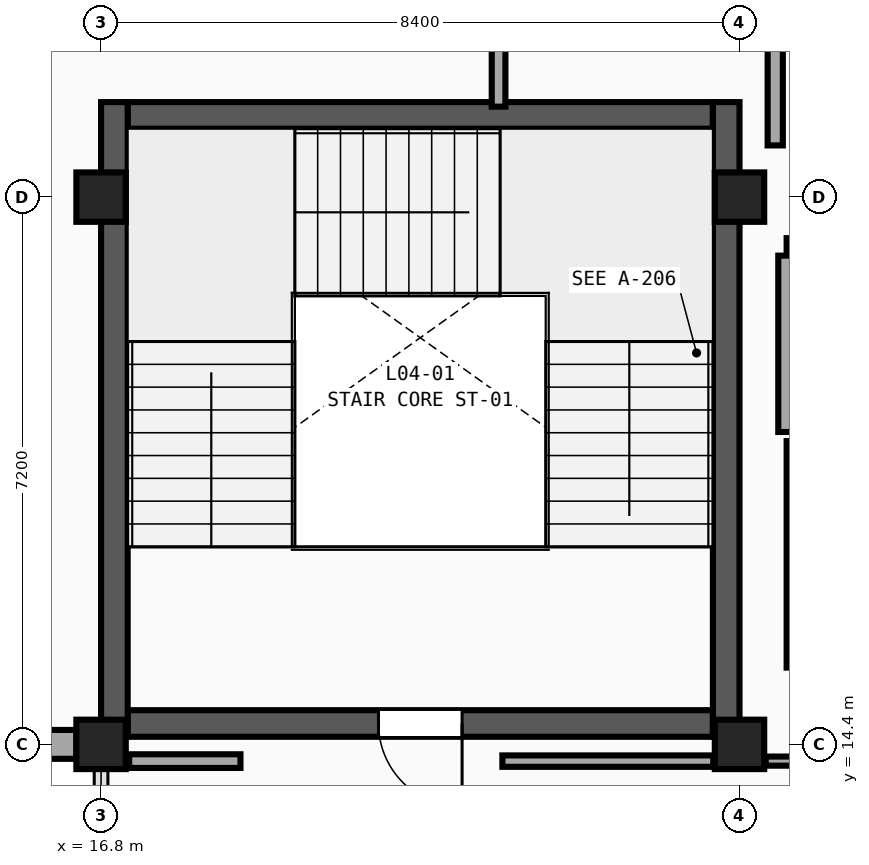
"""IFC4 building model, lengths in metres.
Left out: names, types, materials, properties, quantities, classifications, styles, units other than length and angle.
Written with IfcOpenShell. Run it as: python <this file> out.ifc"""

import sys

from ifc_helpers import new_model, si_unit, direction, frame, frame_2d, origin, origin_2d, place, context, subcontext, project, spatial, rectangle, extrude, element, fill, save


model = new_model("IFC4")
c1 = context("Model", 3, precision=1e-05, world=origin(), true_north=direction((0.0, 1.0)))
c2 = subcontext(c1, "Body", "Model", "MODEL_VIEW")
j1 = project(units=[si_unit("LENGTHUNIT", "METRE"), si_unit("PLANEANGLEUNIT", "RADIAN")], contexts=[c1])
p1 = place(None, origin())
s1 = spatial("IfcSite", under=j1, at=p1, CompositionType="ELEMENT")
p2 = place(p1, origin())
s2 = spatial("IfcBuilding", under=s1, at=p2, CompositionType="ELEMENT")
p3 = place(p2, frame((0.0, 0.0, 18.9)))
s3 = spatial("IfcBuildingStorey", under=s2, at=p3, CompositionType="ELEMENT", Elevation=18.9)
for number, where, z_axis, x_axis in (
    (1, (16.8, 14.4, 0.0), (0.0, 0.0, 1.0), (1.0, 0.0, 0.0)),
    (2, (16.8, 21.6, 0.0), (0.0, 0.0, 1.0), (1.0, 0.0, 0.0)),
    (3, (25.2, 14.4, 0.0), (0.0, 0.0, 1.0), (1.0, 0.0, 0.0)),
    (4, (25.2, 21.6, 0.0), (0.0, 0.0, 1.0), (1.0, 0.0, 0.0)),
):
    element("IfcColumn", number, at=place(p3, frame(where, z_axis=z_axis, x_axis=x_axis)), inside=s3, PredefinedType="COLUMN", context=c2, shape_type="SweptSolid", body=[
        extrude(rectangle(XDim=0.65, YDim=0.65, at=origin_2d()), origin(), (0.0, 0.0, 1.0), 4.5),
    ])
p4 = place(p3, frame((16.475, 14.4, 0.0), z_axis=(0.0, 0.0, 1.0), x_axis=(-1.0, 0.0, 0.0)))
e5 = element("IfcWall", 5, at=p4, inside=s3, PredefinedType="SOLIDWALL", context=c2, shape_type="SweptSolid", body=[
    extrude(rectangle(XDim=7.75, YDim=0.38, at=frame_2d((3.875, 0.0))), origin(), (0.0, 0.0, 1.0), 3.63),
])
p5 = place(p4, frame((1.27, 0.0, 0.75)))
e6 = element("IfcOpeningElement", 6, at=p5, cuts=e5, PredefinedType="OPENING", context=c2, shape_type="SweptSolid", body=[
    extrude(rectangle(XDim=1.8, YDim=2.73, at=frame_2d((0.9, 1.365))), frame((0.0, 0.21, 0.0), z_axis=(0.0, -1.0, 0.0), x_axis=(1.0, 0.0, 0.0)), (0.0, 0.0, 1.0), 0.42),
])
p6 = place(p4, frame((4.58, 0.0, 0.75)))
e7 = element("IfcOpeningElement", 7, at=p6, cuts=e5, PredefinedType="OPENING", context=c2, shape_type="SweptSolid", body=[
    extrude(rectangle(XDim=2.0, YDim=2.73, at=frame_2d((1.0, 1.365))), frame((0.0, 0.21, 0.0), z_axis=(0.0, -1.0, 0.0), x_axis=(1.0, 0.0, 0.0)), (0.0, 0.0, 1.0), 0.42),
])
p7 = place(p3, frame((24.85, 14.675, 0.0), z_axis=(0.0, 0.0, 1.0), x_axis=(-1.0, 0.0, 0.0)))
e8 = element("IfcWall", 8, at=p7, inside=s3, PredefinedType="SHEAR", context=c2, shape_type="SweptSolid", body=[
    extrude(rectangle(XDim=7.7, YDim=0.35, at=frame_2d((3.85, 0.0))), origin(), (0.0, 0.0, 1.0), 4.5),
])
p8 = place(p7, frame((3.3, 0.0, 0.0)))
e9 = element("IfcOpeningElement", 9, at=p8, cuts=e8, PredefinedType="OPENING", context=c2, shape_type="SweptSolid", body=[
    extrude(rectangle(XDim=1.1, YDim=2.2, at=frame_2d((0.55, 1.1))), frame((0.0, 0.195, 0.0), z_axis=(0.0, -1.0, 0.0), x_axis=(1.0, 0.0, 0.0)), (0.0, 0.0, 1.0), 0.39),
])
p9 = place(p3, frame((17.15, 22.675, 0.0), z_axis=(0.0, 0.0, 1.0), x_axis=(1.0, 0.0, 0.0)))
e10 = element("IfcWall", 10, at=p9, inside=s3, PredefinedType="SHEAR", context=c2, shape_type="SweptSolid", body=[
    extrude(rectangle(XDim=7.7, YDim=0.35, at=frame_2d((3.85, 0.0))), origin(), (0.0, 0.0, 1.0), 4.5),
])
for number, where, z_axis, x_axis in (
    (11, (16.975, 22.85, 0.0), (0.0, 0.0, 1.0), (0.0, -1.0, 0.0)),
    (12, (25.025, 14.5, 0.0), (0.0, 0.0, 1.0), (0.0, 1.0, 0.0)),
):
    element("IfcWall", number, at=place(p3, frame(where, z_axis=z_axis, x_axis=x_axis)), inside=s3, PredefinedType="SHEAR", context=c2, shape_type="SweptSolid", body=[
        extrude(rectangle(XDim=8.35, YDim=0.35, at=frame_2d((4.175, 0.0))), origin(), (0.0, 0.0, 1.0), 4.5),
    ])
p10 = place(p3, frame((25.94, 18.39, 0.0), z_axis=(0.0, 0.0, 1.0), x_axis=(0.0, -1.0, 0.0)))
e13 = element("IfcWall", 13, at=p10, inside=s3, PredefinedType="SHEAR", context=c2, shape_type="SweptSolid", body=[
    extrude(rectangle(XDim=2.98, YDim=0.24, at=frame_2d((1.49, 0.0))), origin(), (0.0, 0.0, 1.0), 4.18),
])
p11 = place(p3, frame((25.82, 20.95, 0.0), z_axis=(0.0, 0.0, 1.0), x_axis=(1.0, 0.0, 0.0)))
e14 = element("IfcWall", 14, at=p11, inside=s3, PredefinedType="SOLIDWALL", context=c2, shape_type="SweptSolid", body=[
    extrude(rectangle(XDim=2.54, YDim=0.22, at=frame_2d((1.27, 0.0))), origin(), (0.0, 0.0, 1.0), 3.73),
])
p12 = place(p11, frame((0.745, 0.0, 0.0)))
e15 = element("IfcOpeningElement", 15, at=p12, cuts=e14, PredefinedType="OPENING", context=c2, shape_type="SweptSolid", body=[
    extrude(rectangle(XDim=1.05, YDim=2.15, at=frame_2d((0.525, 1.075))), frame((0.0, 0.13, 0.0), z_axis=(0.0, -1.0, 0.0), x_axis=(1.0, 0.0, 0.0)), (0.0, 0.0, 1.0), 0.26),
])
p13 = place(p3, frame((25.82, 18.51, 0.0), z_axis=(0.0, 0.0, 1.0), x_axis=(0.0, 1.0, 0.0)))
e16 = element("IfcWall", 16, at=p13, inside=s3, PredefinedType="SOLIDWALL", context=c2, shape_type="SweptSolid", body=[
    extrude(rectangle(XDim=2.32, YDim=0.22, at=frame_2d((1.16, 0.0))), origin(), (0.0, 0.0, 1.0), 4.18),
])
p14 = place(p3, frame((22.08, 14.18, 0.0), z_axis=(0.0, 0.0, 1.0), x_axis=(1.0, 0.0, 0.0)))
e17 = element("IfcWall", 17, at=p14, inside=s3, PredefinedType="PARTITIONING", context=c2, shape_type="SweptSolid", body=[
    extrude(rectangle(XDim=2.775, YDim=0.15, at=frame_2d((1.387, 0.0))), origin(), (0.0, 0.0, 1.0), 3.73),
])
p15 = place(p3, frame((25.545, 14.18, 0.0), z_axis=(0.0, 0.0, 1.0), x_axis=(1.0, 0.0, 0.0)))
e18 = element("IfcWall", 18, at=p15, inside=s3, PredefinedType="PARTITIONING", context=c2, shape_type="SweptSolid", body=[
    extrude(rectangle(XDim=7.71, YDim=0.12, at=frame_2d((3.855, 0.0))), origin(), (0.0, 0.0, 1.0), 3.73),
])
p16 = place(p15, frame((3.255, 0.0, 0.0)))
e19 = element("IfcOpeningElement", 19, at=p16, cuts=e18, PredefinedType="OPENING", context=c2, shape_type="SweptSolid", body=[
    extrude(rectangle(XDim=1.2, YDim=2.05, at=frame_2d((0.6, 1.025))), frame((0.0, 0.08, 0.0), z_axis=(0.0, -1.0, 0.0), x_axis=(1.0, 0.0, 0.0)), (0.0, 0.0, 1.0), 0.16),
])
p17 = place(p3, frame((22.03, 22.79, 0.0), z_axis=(0.0, 0.0, 1.0), x_axis=(0.0, 1.0, 0.0)))
e20 = element("IfcWall", 20, at=p17, inside=s3, PredefinedType="PARTITIONING", context=c2, shape_type="SweptSolid", body=[
    extrude(rectangle(XDim=2.23, YDim=0.18, at=frame_2d((1.115, 0.0))), origin(), (0.0, 0.0, 1.0), 4.18),
])
p18 = place(p17, frame((1.188, 0.0, 0.0)))
e21 = element("IfcOpeningElement", 21, at=p18, cuts=e20, PredefinedType="OPENING", context=c2, shape_type="SweptSolid", body=[
    extrude(rectangle(XDim=0.88, YDim=2.45, at=frame_2d((0.44, 1.225))), frame((0.0, 0.11, 0.0), z_axis=(0.0, -1.0, 0.0), x_axis=(1.0, 0.0, 0.0)), (0.0, 0.0, 1.0), 0.22),
])
p19 = place(p3, frame((17.17, 14.18, 0.0), z_axis=(0.0, 0.0, 1.0), x_axis=(1.0, 0.0, 0.0)))
e22 = element("IfcWall", 22, at=p19, inside=s3, PredefinedType="PARTITIONING", context=c2, shape_type="SweptSolid", body=[
    extrude(rectangle(XDim=1.464, YDim=0.18, at=frame_2d((0.732, 0.0))), origin(), (0.0, 0.0, 1.0), 3.73),
])
p20 = place(p3, frame((25.67, 22.28, 0.0), z_axis=(0.0, 0.0, 1.0), x_axis=(0.0, 1.0, 0.0)))
e23 = element("IfcWall", 23, at=p20, inside=s3, PredefinedType="PLUMBINGWALL", context=c2, shape_type="SweptSolid", body=[
    extrude(rectangle(XDim=2.59, YDim=0.2, at=frame_2d((1.295, 0.0))), origin(), (0.0, 0.0, 1.0), 4.18),
])
p21 = place(p8, origin())
e24 = element("IfcDoor", 24, at=p21, inside=s3, OperationType="SINGLE_SWING_LEFT", PredefinedType="DOOR", context=c2, shape_type="SweptSolid", body=[
    extrude(rectangle(XDim=1.1, YDim=2.2, at=frame_2d((0.55, 1.1))), frame((0.0, 0.025, 0.0), z_axis=(0.0, -1.0, 0.0), x_axis=(1.0, 0.0, 0.0)), (0.0, 0.0, 1.0), 0.05),
])
fill(e9, e24)
save(model, sys.argv[1])
